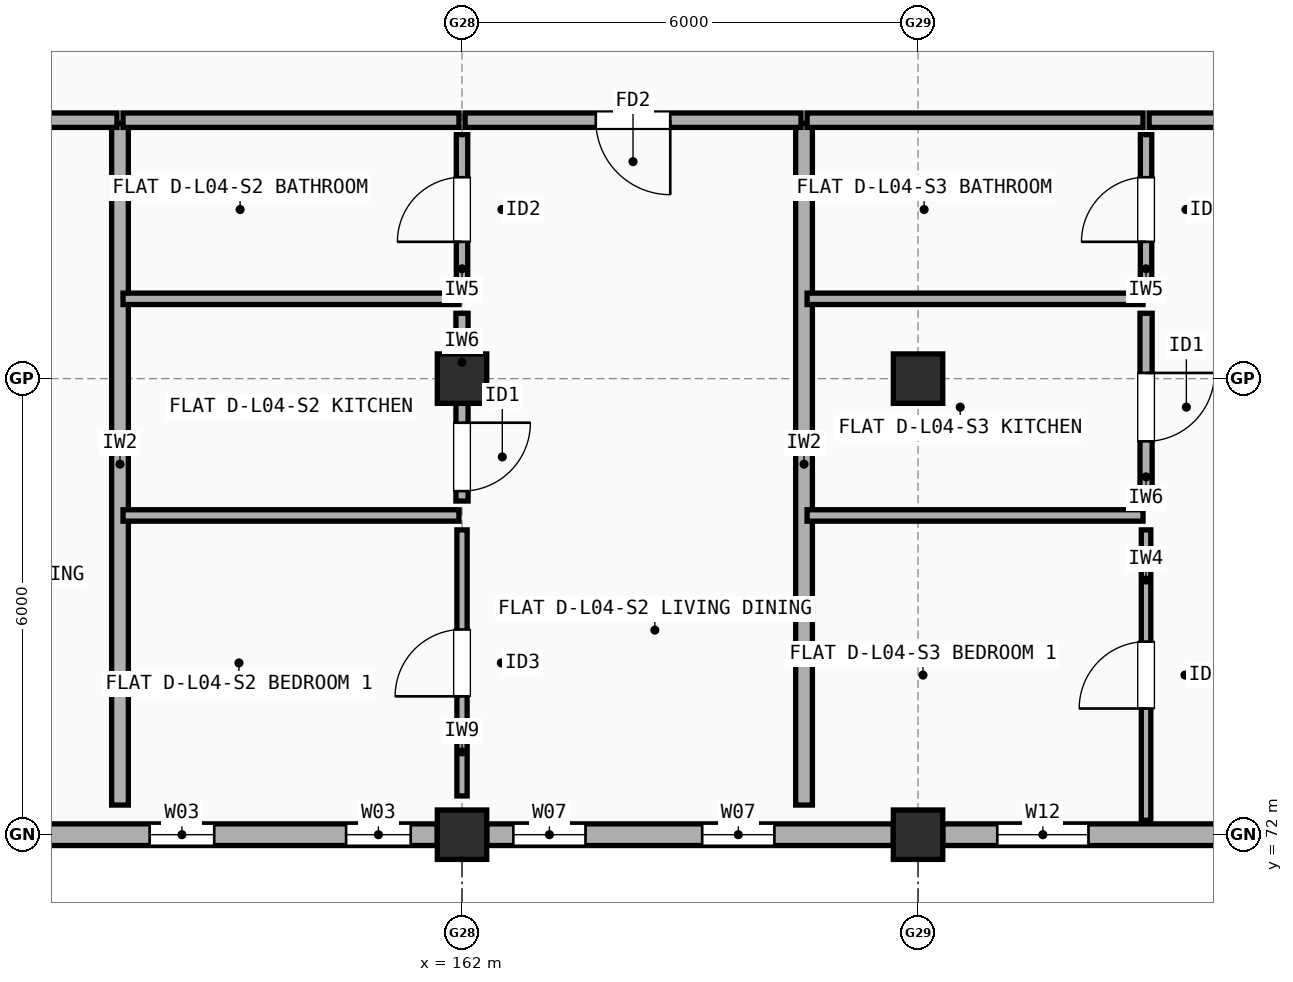
"""IFC4 building model, lengths in metres.
Left out: names, types, materials, properties, quantities, classifications, styles, units other than length and angle.
Written with IfcOpenShell. Run it as: python <this file> out.ifc"""

import sys

from ifc_helpers import new_model, si_unit, direction, frame, frame_2d, origin, origin_2d, place, context, subcontext, project, spatial, rectangle, extrude, element, fill, save


model = new_model("IFC4")
c1 = context("Model", 3, precision=1e-05, world=origin(), true_north=direction((0.0, 1.0)))
c2 = subcontext(c1, "Body", "Model", "MODEL_VIEW")
j1 = project(units=[si_unit("LENGTHUNIT", "METRE"), si_unit("PLANEANGLEUNIT", "RADIAN")], contexts=[c1])
p1 = place(None, origin())
s1 = spatial("IfcSite", under=j1, at=p1, CompositionType="ELEMENT")
p2 = place(p1, origin())
s2 = spatial("IfcBuilding", under=s1, at=p2, CompositionType="ELEMENT")
p3 = place(p2, frame((0.0, 0.0, 14.1)))
s3 = spatial("IfcBuildingStorey", under=s2, at=p3, CompositionType="ELEMENT", Elevation=14.1)
for number, where, z_axis, x_axis in (
    (1, (162.0, 72.0, 0.0), (0.0, 0.0, 1.0), (1.0, 0.0, 0.0)),
    (2, (162.0, 78.0, 0.0), (0.0, 0.0, 1.0), (1.0, 0.0, 0.0)),
    (3, (168.0, 72.0, 0.0), (0.0, 0.0, 1.0), (1.0, 0.0, 0.0)),
    (4, (168.0, 78.0, 0.0), (0.0, 0.0, 1.0), (1.0, 0.0, 0.0)),
):
    element("IfcColumn", number, at=place(p3, frame(where, z_axis=z_axis, x_axis=x_axis)), inside=s3, PredefinedType="COLUMN", context=c2, shape_type="SweptSolid", body=[
        extrude(rectangle(XDim=0.65, YDim=0.65, at=origin_2d()), origin(), (0.0, 0.0, 1.0), 2.95),
    ])
p4 = place(p3, frame((156.275, 72.0, 0.0), z_axis=(0.0, 0.0, 1.0), x_axis=(1.0, 0.0, 0.0)))
e5 = element("IfcWall", 5, at=p4, inside=s3, PredefinedType="STANDARD", context=c2, shape_type="SweptSolid", body=[
    extrude(rectangle(XDim=5.4, YDim=0.285, at=frame_2d((2.7, 0.0))), origin(), (0.0, 0.0, 1.0), 2.432),
])
p5 = place(p4, frame((1.615, 0.0, 0.9)))
e6 = element("IfcOpeningElement", 6, at=p5, cuts=e5, PredefinedType="OPENING", context=c2, shape_type="SweptSolid", body=[
    extrude(rectangle(XDim=0.85, YDim=1.25, at=frame_2d((0.425, 0.625))), frame((0.0, 0.152, 0.0), z_axis=(0.0, -1.0, 0.0), x_axis=(1.0, 0.0, 0.0)), (0.0, 0.0, 1.0), 0.305),
])
p6 = place(p4, frame((4.2, 0.0, 0.9)))
e7 = element("IfcOpeningElement", 7, at=p6, cuts=e5, PredefinedType="OPENING", context=c2, shape_type="SweptSolid", body=[
    extrude(rectangle(XDim=0.85, YDim=1.25, at=frame_2d((0.425, 0.625))), frame((0.0, 0.152, 0.0), z_axis=(0.0, -1.0, 0.0), x_axis=(1.0, 0.0, 0.0)), (0.0, 0.0, 1.0), 0.305),
])
p7 = place(p3, frame((162.325, 72.0, 0.0), z_axis=(0.0, 0.0, 1.0), x_axis=(1.0, 0.0, 0.0)))
e8 = element("IfcWall", 8, at=p7, inside=s3, PredefinedType="STANDARD", context=c2, shape_type="SweptSolid", body=[
    extrude(rectangle(XDim=5.35, YDim=0.285, at=frame_2d((2.675, 0.0))), origin(), (0.0, 0.0, 1.0), 2.432),
])
p8 = place(p7, frame((0.35, 0.0, 0.9)))
e9 = element("IfcOpeningElement", 9, at=p8, cuts=e8, PredefinedType="OPENING", context=c2, shape_type="SweptSolid", body=[
    extrude(rectangle(XDim=0.95, YDim=1.35, at=frame_2d((0.475, 0.675))), frame((0.0, 0.152, 0.0), z_axis=(0.0, -1.0, 0.0), x_axis=(1.0, 0.0, 0.0)), (0.0, 0.0, 1.0), 0.305),
])
p9 = place(p7, frame((2.835, 0.0, 0.9)))
e10 = element("IfcOpeningElement", 10, at=p9, cuts=e8, PredefinedType="OPENING", context=c2, shape_type="SweptSolid", body=[
    extrude(rectangle(XDim=0.95, YDim=1.35, at=frame_2d((0.475, 0.675))), frame((0.0, 0.152, 0.0), z_axis=(0.0, -1.0, 0.0), x_axis=(1.0, 0.0, 0.0)), (0.0, 0.0, 1.0), 0.305),
])
p10 = place(p3, frame((168.325, 72.0, 0.0), z_axis=(0.0, 0.0, 1.0), x_axis=(1.0, 0.0, 0.0)))
e11 = element("IfcWall", 11, at=p10, inside=s3, PredefinedType="STANDARD", context=c2, shape_type="SweptSolid", body=[
    extrude(rectangle(XDim=5.35, YDim=0.285, at=frame_2d((2.675, 0.0))), origin(), (0.0, 0.0, 1.0), 2.432),
])
p11 = place(p10, frame((0.718, 0.0, 0.9)))
e12 = element("IfcOpeningElement", 12, at=p11, cuts=e11, PredefinedType="OPENING", context=c2, shape_type="SweptSolid", body=[
    extrude(rectangle(XDim=1.2, YDim=1.35, at=frame_2d((0.6, 0.675))), frame((0.0, 0.152, 0.0), z_axis=(0.0, -1.0, 0.0), x_axis=(1.0, 0.0, 0.0)), (0.0, 0.0, 1.0), 0.305),
])
p12 = place(p10, frame((3.633, 0.0, 0.9)))
e13 = element("IfcOpeningElement", 13, at=p12, cuts=e11, PredefinedType="OPENING", context=c2, shape_type="SweptSolid", body=[
    extrude(rectangle(XDim=0.8, YDim=1.2, at=frame_2d((0.4, 0.6))), frame((0.0, 0.152, 0.0), z_axis=(0.0, -1.0, 0.0), x_axis=(1.0, 0.0, 0.0)), (0.0, 0.0, 1.0), 0.305),
])
p13 = place(p3, frame((157.5, 72.39, 0.0), z_axis=(0.0, 0.0, 1.0), x_axis=(0.0, 1.0, 0.0)))
e14 = element("IfcWall", 14, at=p13, inside=s3, PredefinedType="SOLIDWALL", context=c2, shape_type="SweptSolid", body=[
    extrude(rectangle(XDim=8.97, YDim=0.22, at=frame_2d((4.485, 0.0))), origin(), (0.0, 0.0, 1.0), 2.432),
])
p14 = place(p3, frame((153.04, 81.4, 0.0), z_axis=(0.0, 0.0, 1.0), x_axis=(1.0, 0.0, 0.0)))
e15 = element("IfcWall", 15, at=p14, inside=s3, PredefinedType="SOLIDWALL", context=c2, shape_type="SweptSolid", body=[
    extrude(rectangle(XDim=4.42, YDim=0.19, at=frame_2d((2.21, 0.0))), origin(), (0.0, 0.0, 1.0), 2.432),
])
p15 = place(p14, frame((1.71, 0.0, 0.0)))
e16 = element("IfcOpeningElement", 16, at=p15, cuts=e15, PredefinedType="OPENING", context=c2, shape_type="SweptSolid", body=[
    extrude(rectangle(XDim=1.0, YDim=2.15, at=frame_2d((0.5, 1.075))), frame((0.0, 0.105, 0.0), z_axis=(0.0, -1.0, 0.0), x_axis=(1.0, 0.0, 0.0)), (0.0, 0.0, 1.0), 0.21),
])
p16 = place(p3, frame((166.5, 72.39, 0.0), z_axis=(0.0, 0.0, 1.0), x_axis=(0.0, 1.0, 0.0)))
e17 = element("IfcWall", 17, at=p16, inside=s3, PredefinedType="SOLIDWALL", context=c2, shape_type="SweptSolid", body=[
    extrude(rectangle(XDim=8.97, YDim=0.22, at=frame_2d((4.485, 0.0))), origin(), (0.0, 0.0, 1.0), 2.432),
])
p17 = place(p3, frame((157.54, 81.4, 0.0), z_axis=(0.0, 0.0, 1.0), x_axis=(1.0, 0.0, 0.0)))
e18 = element("IfcWall", 18, at=p17, inside=s3, PredefinedType="SOLIDWALL", context=c2, shape_type="SweptSolid", body=[
    extrude(rectangle(XDim=4.42, YDim=0.19, at=frame_2d((2.21, 0.0))), origin(), (0.0, 0.0, 1.0), 2.508),
])
p18 = place(p3, frame((162.04, 81.4, 0.0), z_axis=(0.0, 0.0, 1.0), x_axis=(1.0, 0.0, 0.0)))
e19 = element("IfcWall", 19, at=p18, inside=s3, PredefinedType="SOLIDWALL", context=c2, shape_type="SweptSolid", body=[
    extrude(rectangle(XDim=4.42, YDim=0.19, at=frame_2d((2.21, 0.0))), origin(), (0.0, 0.0, 1.0), 2.508),
])
p19 = place(p18, frame((1.72, 0.0, 0.0)))
e20 = element("IfcOpeningElement", 20, at=p19, cuts=e19, PredefinedType="OPENING", context=c2, shape_type="SweptSolid", body=[
    extrude(rectangle(XDim=0.98, YDim=2.15, at=frame_2d((0.49, 1.075))), frame((0.0, 0.105, 0.0), z_axis=(0.0, -1.0, 0.0), x_axis=(1.0, 0.0, 0.0)), (0.0, 0.0, 1.0), 0.21),
])
p20 = place(p3, frame((162.0, 72.51, 0.0), z_axis=(0.0, 0.0, 1.0), x_axis=(0.0, 1.0, 0.0)))
e21 = element("IfcWall", 21, at=p20, inside=s3, PredefinedType="PARTITIONING", context=c2, shape_type="SweptSolid", body=[
    extrude(rectangle(XDim=3.5, YDim=0.135, at=frame_2d((1.75, 0.0))), origin(), (0.0, 0.0, 1.0), 2.548),
])
p21 = place(p20, frame((1.31, 0.0, 0.0)))
e22 = element("IfcOpeningElement", 22, at=p21, cuts=e21, PredefinedType="OPENING", context=c2, shape_type="SweptSolid", body=[
    extrude(rectangle(XDim=0.88, YDim=2.1, at=frame_2d((0.44, 1.05))), frame((0.0, 0.077, 0.0), z_axis=(0.0, -1.0, 0.0), x_axis=(1.0, 0.0, 0.0)), (0.0, 0.0, 1.0), 0.155),
])
p22 = place(p3, frame((162.0, 76.39, 0.0), z_axis=(0.0, 0.0, 1.0), x_axis=(0.0, 1.0, 0.0)))
e23 = element("IfcWall", 23, at=p22, inside=s3, PredefinedType="PLUMBINGWALL", context=c2, shape_type="SweptSolid", body=[
    extrude(rectangle(XDim=2.47, YDim=0.16, at=frame_2d((1.235, 0.0))), origin(), (0.0, 0.0, 1.0), 2.508),
])
p23 = place(p22, frame((0.13, 0.0, 0.0)))
e24 = element("IfcOpeningElement", 24, at=p23, cuts=e23, PredefinedType="OPENING", context=c2, shape_type="SweptSolid", body=[
    extrude(rectangle(XDim=0.9, YDim=2.1, at=frame_2d((0.45, 1.05))), frame((0.0, 0.09, 0.0), z_axis=(0.0, -1.0, 0.0), x_axis=(1.0, 0.0, 0.0)), (0.0, 0.0, 1.0), 0.18),
])
p24 = place(p3, frame((162.0, 79.24, 0.0), z_axis=(0.0, 0.0, 1.0), x_axis=(0.0, 1.0, 0.0)))
e25 = element("IfcWall", 25, at=p24, inside=s3, PredefinedType="PARTITIONING", context=c2, shape_type="SweptSolid", body=[
    extrude(rectangle(XDim=1.97, YDim=0.15, at=frame_2d((0.985, 0.0))), origin(), (0.0, 0.0, 1.0), 2.508),
])
p25 = place(p24, frame((0.56, 0.0, 0.0)))
e26 = element("IfcOpeningElement", 26, at=p25, cuts=e25, PredefinedType="OPENING", context=c2, shape_type="SweptSolid", body=[
    extrude(rectangle(XDim=0.85, YDim=2.1, at=frame_2d((0.425, 1.05))), frame((0.0, 0.085, 0.0), z_axis=(0.0, -1.0, 0.0), x_axis=(1.0, 0.0, 0.0)), (0.0, 0.0, 1.0), 0.17),
])
p26 = place(p3, frame((157.54, 76.2, 0.0), z_axis=(0.0, 0.0, 1.0), x_axis=(1.0, 0.0, 0.0)))
e27 = element("IfcWall", 27, at=p26, inside=s3, PredefinedType="PARTITIONING", context=c2, shape_type="SweptSolid", body=[
    extrude(rectangle(XDim=4.42, YDim=0.15, at=frame_2d((2.21, 0.0))), origin(), (0.0, 0.0, 1.0), 2.548),
])
p27 = place(p3, frame((157.54, 79.05, 0.0), z_axis=(0.0, 0.0, 1.0), x_axis=(1.0, 0.0, 0.0)))
e28 = element("IfcWall", 28, at=p27, inside=s3, PredefinedType="PARTITIONING", context=c2, shape_type="SweptSolid", body=[
    extrude(rectangle(XDim=4.42, YDim=0.15, at=frame_2d((2.21, 0.0))), origin(), (0.0, 0.0, 1.0), 2.508),
])
p28 = place(p3, frame((166.54, 81.4, 0.0), z_axis=(0.0, 0.0, 1.0), x_axis=(1.0, 0.0, 0.0)))
e29 = element("IfcWall", 29, at=p28, inside=s3, PredefinedType="SOLIDWALL", context=c2, shape_type="SweptSolid", body=[
    extrude(rectangle(XDim=4.42, YDim=0.19, at=frame_2d((2.21, 0.0))), origin(), (0.0, 0.0, 1.0), 2.458),
])
p29 = place(p3, frame((171.04, 81.4, 0.0), z_axis=(0.0, 0.0, 1.0), x_axis=(1.0, 0.0, 0.0)))
e30 = element("IfcWall", 30, at=p29, inside=s3, PredefinedType="SOLIDWALL", context=c2, shape_type="SweptSolid", body=[
    extrude(rectangle(XDim=4.42, YDim=0.19, at=frame_2d((2.21, 0.0))), origin(), (0.0, 0.0, 1.0), 2.508),
])
p30 = place(p29, frame((1.685, 0.0, 0.0)))
e31 = element("IfcOpeningElement", 31, at=p30, cuts=e30, PredefinedType="OPENING", context=c2, shape_type="SweptSolid", body=[
    extrude(rectangle(XDim=1.05, YDim=2.15, at=frame_2d((0.525, 1.075))), frame((0.0, 0.105, 0.0), z_axis=(0.0, -1.0, 0.0), x_axis=(1.0, 0.0, 0.0)), (0.0, 0.0, 1.0), 0.21),
])
p31 = place(p3, frame((171.0, 72.19, 0.0), z_axis=(0.0, 0.0, 1.0), x_axis=(0.0, 1.0, 0.0)))
e32 = element("IfcWall", 32, at=p31, inside=s3, PredefinedType="PARTITIONING", context=c2, shape_type="SweptSolid", body=[
    extrude(rectangle(XDim=3.82, YDim=0.125, at=frame_2d((1.91, 0.0))), origin(), (0.0, 0.0, 1.0), 2.95),
])
p32 = place(p31, frame((1.47, 0.0, 0.0)))
e33 = element("IfcOpeningElement", 33, at=p32, cuts=e32, PredefinedType="OPENING", context=c2, shape_type="SweptSolid", body=[
    extrude(rectangle(XDim=0.88, YDim=2.1, at=frame_2d((0.44, 1.05))), frame((0.0, 0.073, 0.0), z_axis=(0.0, -1.0, 0.0), x_axis=(1.0, 0.0, 0.0)), (0.0, 0.0, 1.0), 0.145),
])
p33 = place(p3, frame((171.0, 76.39, 0.0), z_axis=(0.0, 0.0, 1.0), x_axis=(0.0, 1.0, 0.0)))
e34 = element("IfcWall", 34, at=p33, inside=s3, PredefinedType="PLUMBINGWALL", context=c2, shape_type="SweptSolid", body=[
    extrude(rectangle(XDim=2.47, YDim=0.16, at=frame_2d((1.235, 0.0))), origin(), (0.0, 0.0, 1.0), 2.432),
])
p34 = place(p33, frame((0.785, 0.0, 0.0)))
e35 = element("IfcOpeningElement", 35, at=p34, cuts=e34, PredefinedType="OPENING", context=c2, shape_type="SweptSolid", body=[
    extrude(rectangle(XDim=0.9, YDim=2.1, at=frame_2d((0.45, 1.05))), frame((0.0, 0.09, 0.0), z_axis=(0.0, -1.0, 0.0), x_axis=(1.0, 0.0, 0.0)), (0.0, 0.0, 1.0), 0.18),
])
p35 = place(p3, frame((171.0, 79.24, 0.0), z_axis=(0.0, 0.0, 1.0), x_axis=(0.0, 1.0, 0.0)))
e36 = element("IfcWall", 36, at=p35, inside=s3, PredefinedType="PARTITIONING", context=c2, shape_type="SweptSolid", body=[
    extrude(rectangle(XDim=1.97, YDim=0.15, at=frame_2d((0.985, 0.0))), origin(), (0.0, 0.0, 1.0), 2.95),
])
p36 = place(p35, frame((0.56, 0.0, 0.0)))
e37 = element("IfcOpeningElement", 37, at=p36, cuts=e36, PredefinedType="OPENING", context=c2, shape_type="SweptSolid", body=[
    extrude(rectangle(XDim=0.85, YDim=2.1, at=frame_2d((0.425, 1.05))), frame((0.0, 0.085, 0.0), z_axis=(0.0, -1.0, 0.0), x_axis=(1.0, 0.0, 0.0)), (0.0, 0.0, 1.0), 0.17),
])
p37 = place(p3, frame((166.54, 76.2, 0.0), z_axis=(0.0, 0.0, 1.0), x_axis=(1.0, 0.0, 0.0)))
e38 = element("IfcWall", 38, at=p37, inside=s3, PredefinedType="PARTITIONING", context=c2, shape_type="SweptSolid", body=[
    extrude(rectangle(XDim=4.42, YDim=0.15, at=frame_2d((2.21, 0.0))), origin(), (0.0, 0.0, 1.0), 2.508),
])
p38 = place(p3, frame((166.54, 79.05, 0.0), z_axis=(0.0, 0.0, 1.0), x_axis=(1.0, 0.0, 0.0)))
e39 = element("IfcWall", 39, at=p38, inside=s3, PredefinedType="PARTITIONING", context=c2, shape_type="SweptSolid", body=[
    extrude(rectangle(XDim=4.42, YDim=0.15, at=frame_2d((2.21, 0.0))), origin(), (0.0, 0.0, 1.0), 2.458),
])
p39 = place(p5, origin())
e40 = element("IfcWindow", 40, at=p39, inside=s3, PartitioningType="SINGLE_PANEL", PredefinedType="WINDOW", context=c2, shape_type="SweptSolid", body=[
    extrude(rectangle(XDim=0.85, YDim=1.25, at=frame_2d((0.425, 0.625))), frame((0.0, 0.03, 0.0), z_axis=(0.0, -1.0, 0.0), x_axis=(1.0, 0.0, 0.0)), (0.0, 0.0, 1.0), 0.06),
])
fill(e6, e40)
p40 = place(p6, origin())
e41 = element("IfcWindow", 41, at=p40, inside=s3, PartitioningType="SINGLE_PANEL", PredefinedType="WINDOW", context=c2, shape_type="SweptSolid", body=[
    extrude(rectangle(XDim=0.85, YDim=1.25, at=frame_2d((0.425, 0.625))), frame((0.0, 0.03, 0.0), z_axis=(0.0, -1.0, 0.0), x_axis=(1.0, 0.0, 0.0)), (0.0, 0.0, 1.0), 0.06),
])
fill(e7, e41)
p41 = place(p8, origin())
e42 = element("IfcWindow", 42, at=p41, inside=s3, PartitioningType="SINGLE_PANEL", PredefinedType="WINDOW", context=c2, shape_type="SweptSolid", body=[
    extrude(rectangle(XDim=0.95, YDim=1.35, at=frame_2d((0.475, 0.675))), frame((0.0, 0.03, 0.0), z_axis=(0.0, -1.0, 0.0), x_axis=(1.0, 0.0, 0.0)), (0.0, 0.0, 1.0), 0.06),
])
fill(e9, e42)
p42 = place(p9, origin())
e43 = element("IfcWindow", 43, at=p42, inside=s3, PartitioningType="SINGLE_PANEL", PredefinedType="WINDOW", context=c2, shape_type="SweptSolid", body=[
    extrude(rectangle(XDim=0.95, YDim=1.35, at=frame_2d((0.475, 0.675))), frame((0.0, 0.03, 0.0), z_axis=(0.0, -1.0, 0.0), x_axis=(1.0, 0.0, 0.0)), (0.0, 0.0, 1.0), 0.06),
])
fill(e10, e43)
p43 = place(p11, origin())
e44 = element("IfcWindow", 44, at=p43, inside=s3, PartitioningType="SINGLE_PANEL", PredefinedType="WINDOW", context=c2, shape_type="SweptSolid", body=[
    extrude(rectangle(XDim=1.2, YDim=1.35, at=frame_2d((0.6, 0.675))), frame((0.0, 0.03, 0.0), z_axis=(0.0, -1.0, 0.0), x_axis=(1.0, 0.0, 0.0)), (0.0, 0.0, 1.0), 0.06),
])
fill(e12, e44)
p44 = place(p19, origin())
e45 = element("IfcDoor", 45, at=p44, inside=s3, OperationType="SINGLE_SWING_RIGHT", PredefinedType="DOOR", context=c2, shape_type="SweptSolid", body=[
    extrude(rectangle(XDim=0.98, YDim=2.15, at=frame_2d((0.49, 1.075))), frame((0.0, 0.025, 0.0), z_axis=(0.0, -1.0, 0.0), x_axis=(1.0, 0.0, 0.0)), (0.0, 0.0, 1.0), 0.05),
])
fill(e20, e45)
p45 = place(p21, origin())
e46 = element("IfcDoor", 46, at=p45, inside=s3, OperationType="SINGLE_SWING_LEFT", PredefinedType="DOOR", context=c2, shape_type="SweptSolid", body=[
    extrude(rectangle(XDim=0.88, YDim=2.1, at=frame_2d((0.44, 1.05))), frame((0.0, 0.025, 0.0), z_axis=(0.0, -1.0, 0.0), x_axis=(1.0, 0.0, 0.0)), (0.0, 0.0, 1.0), 0.05),
])
fill(e22, e46)
p46 = place(p23, origin())
e47 = element("IfcDoor", 47, at=p46, inside=s3, OperationType="SINGLE_SWING_RIGHT", PredefinedType="DOOR", context=c2, shape_type="SweptSolid", body=[
    extrude(rectangle(XDim=0.9, YDim=2.1, at=frame_2d((0.45, 1.05))), frame((0.0, 0.025, 0.0), z_axis=(0.0, -1.0, 0.0), x_axis=(1.0, 0.0, 0.0)), (0.0, 0.0, 1.0), 0.05),
])
fill(e24, e47)
p47 = place(p25, origin())
e48 = element("IfcDoor", 48, at=p47, inside=s3, OperationType="SINGLE_SWING_LEFT", PredefinedType="DOOR", context=c2, shape_type="SweptSolid", body=[
    extrude(rectangle(XDim=0.85, YDim=2.1, at=frame_2d((0.425, 1.05))), frame((0.0, 0.025, 0.0), z_axis=(0.0, -1.0, 0.0), x_axis=(1.0, 0.0, 0.0)), (0.0, 0.0, 1.0), 0.05),
])
fill(e26, e48)
p48 = place(p32, origin())
e49 = element("IfcDoor", 49, at=p48, inside=s3, OperationType="SINGLE_SWING_LEFT", PredefinedType="DOOR", context=c2, shape_type="SweptSolid", body=[
    extrude(rectangle(XDim=0.88, YDim=2.1, at=frame_2d((0.44, 1.05))), frame((0.0, 0.025, 0.0), z_axis=(0.0, -1.0, 0.0), x_axis=(1.0, 0.0, 0.0)), (0.0, 0.0, 1.0), 0.05),
])
fill(e33, e49)
p49 = place(p34, origin())
e50 = element("IfcDoor", 50, at=p49, inside=s3, OperationType="SINGLE_SWING_RIGHT", PredefinedType="DOOR", context=c2, shape_type="SweptSolid", body=[
    extrude(rectangle(XDim=0.9, YDim=2.1, at=frame_2d((0.45, 1.05))), frame((0.0, 0.025, 0.0), z_axis=(0.0, -1.0, 0.0), x_axis=(1.0, 0.0, 0.0)), (0.0, 0.0, 1.0), 0.05),
])
fill(e35, e50)
p50 = place(p36, origin())
e51 = element("IfcDoor", 51, at=p50, inside=s3, OperationType="SINGLE_SWING_LEFT", PredefinedType="DOOR", context=c2, shape_type="SweptSolid", body=[
    extrude(rectangle(XDim=0.85, YDim=2.1, at=frame_2d((0.425, 1.05))), frame((0.0, 0.025, 0.0), z_axis=(0.0, -1.0, 0.0), x_axis=(1.0, 0.0, 0.0)), (0.0, 0.0, 1.0), 0.05),
])
fill(e37, e51)
save(model, sys.argv[1])
